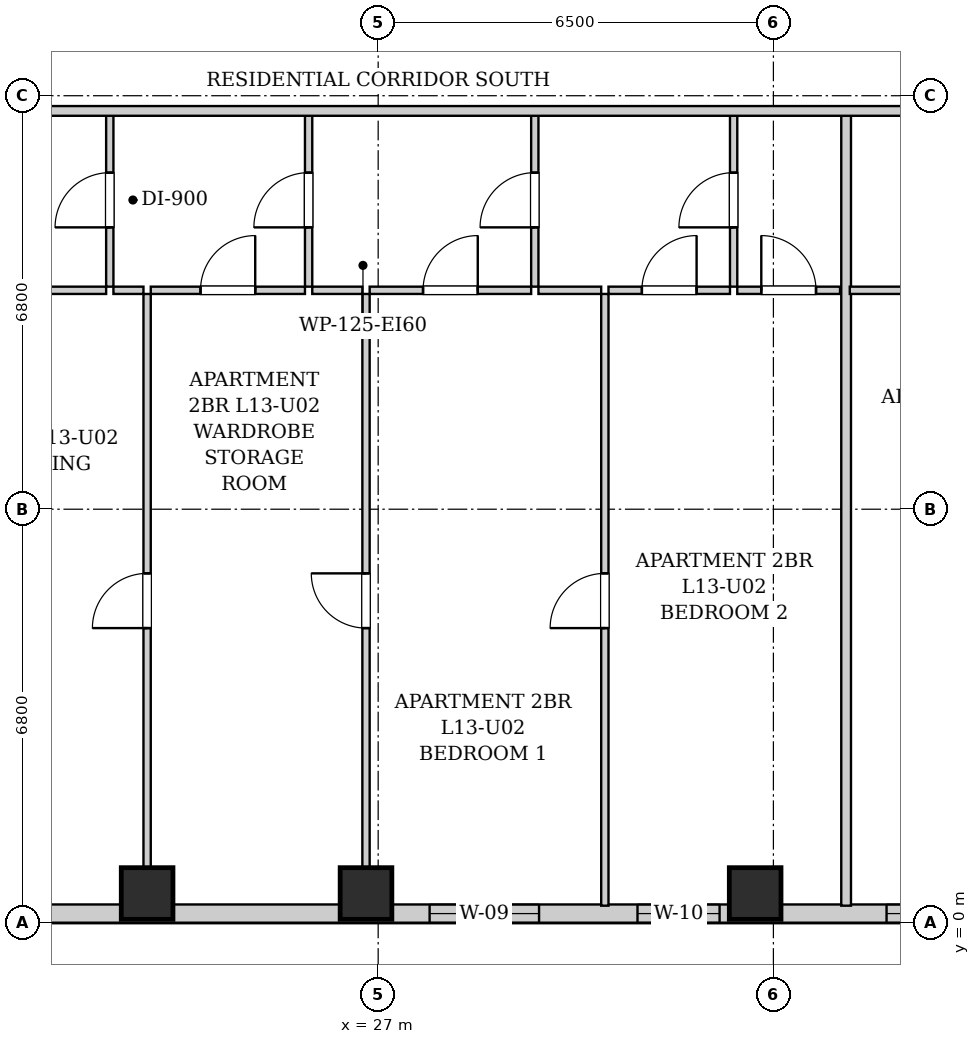
"""IFC4 building model, lengths in metres.
Left out: names, types, materials, properties, quantities, classifications, styles, units other than length and angle.
Written with IfcOpenShell. Run it as: python <this file> out.ifc"""

import sys

from ifc_helpers import new_model, si_unit, direction, frame, frame_2d, origin, origin_2d, place, context, subcontext, project, spatial, rectangle, extrude, element, fill, save


model = new_model("IFC4")
c1 = context("Model", 3, precision=1e-05, world=origin(), true_north=direction((0.0, 1.0)))
c2 = subcontext(c1, "Body", "Model", "MODEL_VIEW")
j1 = project(units=[si_unit("LENGTHUNIT", "METRE"), si_unit("PLANEANGLEUNIT", "RADIAN")], contexts=[c1])
p1 = place(None, origin())
s1 = spatial("IfcSite", under=j1, at=p1, CompositionType="ELEMENT")
p2 = place(p1, origin())
s2 = spatial("IfcBuilding", under=s1, at=p2, CompositionType="ELEMENT")
p3 = place(p2, frame((0.0, 0.0, 51.4)))
s3 = spatial("IfcBuildingStorey", under=s2, at=p3, CompositionType="ELEMENT", Elevation=51.4)
for number, where, z_axis, x_axis in (
    (1, (23.2, 0.48, 0.0), (0.0, 0.0, 1.0), (1.0, 0.0, 0.0)),
    (2, (26.8, 0.48, 0.0), (0.0, 0.0, 1.0), (1.0, 0.0, 0.0)),
    (3, (33.2, 0.48, 0.0), (0.0, 0.0, 1.0), (1.0, 0.0, 0.0)),
):
    element("IfcColumn", number, at=place(p3, frame(where, z_axis=z_axis, x_axis=x_axis)), inside=s3, PredefinedType="COLUMN", context=c2, shape_type="SweptSolid", body=[
        extrude(rectangle(XDim=0.85, YDim=0.85, at=origin_2d()), origin(), (0.0, 0.0, 1.0), 3.2),
    ])
p4 = place(p3, frame((44.0, 0.15, 0.0), z_axis=(0.0, 0.0, 1.0), x_axis=(-1.0, 0.0, 0.0)))
e4 = element("IfcWall", 4, at=p4, inside=s3, PredefinedType="SOLIDWALL", context=c2, shape_type="SweptSolid", body=[
    extrude(rectangle(XDim=26.15, YDim=0.3, at=frame_2d((13.075, 0.0))), origin(), (0.0, 0.0, 1.0), 1.975),
])
p5 = place(p4, frame((22.47, 0.0, 0.55)))
e5 = element("IfcOpeningElement", 5, at=p5, cuts=e4, PredefinedType="OPENING", context=c2, shape_type="SweptSolid", body=[
    extrude(rectangle(XDim=1.8, YDim=1.2, at=frame_2d((0.9, 0.6))), frame((0.0, 0.16, 0.0), z_axis=(0.0, -1.0, 0.0), x_axis=(1.0, 0.0, 0.0)), (0.0, 0.0, 1.0), 0.32),
])
p6 = place(p4, frame((14.354, 0.0, 0.55)))
e6 = element("IfcOpeningElement", 6, at=p6, cuts=e4, PredefinedType="OPENING", context=c2, shape_type="SweptSolid", body=[
    extrude(rectangle(XDim=1.8, YDim=1.2, at=frame_2d((0.9, 0.6))), frame((0.0, 0.16, 0.0), z_axis=(0.0, -1.0, 0.0), x_axis=(1.0, 0.0, 0.0)), (0.0, 0.0, 1.0), 0.32),
])
p7 = place(p4, frame((11.385, 0.0, 0.55)))
e7 = element("IfcOpeningElement", 7, at=p7, cuts=e4, PredefinedType="OPENING", context=c2, shape_type="SweptSolid", body=[
    extrude(rectangle(XDim=1.35, YDim=1.2, at=frame_2d((0.675, 0.6))), frame((0.0, 0.16, 0.0), z_axis=(0.0, -1.0, 0.0), x_axis=(1.0, 0.0, 0.0)), (0.0, 0.0, 1.0), 0.32),
])
p8 = place(p4, frame((6.839, 0.0, 0.55)))
e8 = element("IfcOpeningElement", 8, at=p8, cuts=e4, PredefinedType="OPENING", context=c2, shape_type="SweptSolid", body=[
    extrude(rectangle(XDim=1.8, YDim=1.2, at=frame_2d((0.9, 0.6))), frame((0.0, 0.16, 0.0), z_axis=(0.0, -1.0, 0.0), x_axis=(1.0, 0.0, 0.0)), (0.0, 0.0, 1.0), 0.32),
])
p9 = place(p4, frame((2.332, 0.0, 0.55)))
e9 = element("IfcOpeningElement", 9, at=p9, cuts=e4, PredefinedType="OPENING", context=c2, shape_type="SweptSolid", body=[
    extrude(rectangle(XDim=1.8, YDim=1.2, at=frame_2d((0.9, 0.6))), frame((0.0, 0.16, 0.0), z_axis=(0.0, -1.0, 0.0), x_axis=(1.0, 0.0, 0.0)), (0.0, 0.0, 1.0), 0.32),
])
p10 = place(p3, frame((22.586, 10.46, 0.0), z_axis=(0.0, 0.0, 1.0), x_axis=(0.0, 1.0, 0.0)))
e10 = element("IfcWall", 10, at=p10, inside=s3, PredefinedType="PARTITIONING", context=c2, shape_type="SweptSolid", body=[
    extrude(rectangle(XDim=2.85, YDim=0.12, at=frame_2d((1.425, 0.0))), origin(), (0.0, 0.0, 1.0), 2.94),
])
p11 = place(p10, frame((0.975, 0.0, 0.0)))
e11 = element("IfcOpeningElement", 11, at=p11, cuts=e10, PredefinedType="OPENING", context=c2, shape_type="SweptSolid", body=[
    extrude(rectangle(XDim=0.9, YDim=2.05, at=frame_2d((0.45, 1.025))), frame((0.0, 0.07, 0.0), z_axis=(0.0, -1.0, 0.0), x_axis=(1.0, 0.0, 0.0)), (0.0, 0.0, 1.0), 0.14),
])
p12 = place(p3, frame((18.086, 10.4, 0.0), z_axis=(0.0, 0.0, 1.0), x_axis=(1.0, 0.0, 0.0)))
e12 = element("IfcWall", 12, at=p12, inside=s3, PredefinedType="PARTITIONING", context=c2, shape_type="SweptSolid", body=[
    extrude(rectangle(XDim=4.44, YDim=0.12, at=frame_2d((2.22, 0.0))), origin(), (0.0, 0.0, 1.0), 2.94),
])
p13 = place(p12, frame((1.77, 0.0, 0.0)))
e13 = element("IfcOpeningElement", 13, at=p13, cuts=e12, PredefinedType="OPENING", context=c2, shape_type="SweptSolid", body=[
    extrude(rectangle(XDim=0.9, YDim=2.05, at=frame_2d((0.45, 1.025))), frame((0.0, 0.07, 0.0), z_axis=(0.0, -1.0, 0.0), x_axis=(1.0, 0.0, 0.0)), (0.0, 0.0, 1.0), 0.14),
])
p14 = place(p3, frame((25.856, 10.46, 0.0), z_axis=(0.0, 0.0, 1.0), x_axis=(0.0, 1.0, 0.0)))
e14 = element("IfcWall", 14, at=p14, inside=s3, PredefinedType="PARTITIONING", context=c2, shape_type="SweptSolid", body=[
    extrude(rectangle(XDim=2.85, YDim=0.12, at=frame_2d((1.425, 0.0))), origin(), (0.0, 0.0, 1.0), 2.94),
])
p15 = place(p14, frame((0.975, 0.0, 0.0)))
e15 = element("IfcOpeningElement", 15, at=p15, cuts=e14, PredefinedType="OPENING", context=c2, shape_type="SweptSolid", body=[
    extrude(rectangle(XDim=0.9, YDim=2.05, at=frame_2d((0.45, 1.025))), frame((0.0, 0.07, 0.0), z_axis=(0.0, -1.0, 0.0), x_axis=(1.0, 0.0, 0.0)), (0.0, 0.0, 1.0), 0.14),
])
p16 = place(p3, frame((22.646, 10.4, 0.0), z_axis=(0.0, 0.0, 1.0), x_axis=(1.0, 0.0, 0.0)))
e16 = element("IfcWall", 16, at=p16, inside=s3, PredefinedType="PARTITIONING", context=c2, shape_type="SweptSolid", body=[
    extrude(rectangle(XDim=0.494, YDim=0.12, at=frame_2d((0.247, 0.0))), origin(), (0.0, 0.0, 1.0), 2.94),
])
p17 = place(p3, frame((23.26, 10.4, 0.0), z_axis=(0.0, 0.0, 1.0), x_axis=(1.0, 0.0, 0.0)))
e17 = element("IfcWall", 17, at=p17, inside=s3, PredefinedType="PARTITIONING", context=c2, shape_type="SweptSolid", body=[
    extrude(rectangle(XDim=2.536, YDim=0.12, at=frame_2d((1.268, 0.0))), origin(), (0.0, 0.0, 1.0), 2.94),
])
p18 = place(p17, frame((0.818, 0.0, 0.0)))
e18 = element("IfcOpeningElement", 18, at=p18, cuts=e17, PredefinedType="OPENING", context=c2, shape_type="SweptSolid", body=[
    extrude(rectangle(XDim=0.9, YDim=2.05, at=frame_2d((0.45, 1.025))), frame((0.0, 0.07, 0.0), z_axis=(0.0, -1.0, 0.0), x_axis=(1.0, 0.0, 0.0)), (0.0, 0.0, 1.0), 0.14),
])
p19 = place(p3, frame((29.576, 10.46, 0.0), z_axis=(0.0, 0.0, 1.0), x_axis=(0.0, 1.0, 0.0)))
e19 = element("IfcWall", 19, at=p19, inside=s3, PredefinedType="PARTITIONING", context=c2, shape_type="SweptSolid", body=[
    extrude(rectangle(XDim=2.85, YDim=0.12, at=frame_2d((1.425, 0.0))), origin(), (0.0, 0.0, 1.0), 2.94),
])
p20 = place(p19, frame((0.975, 0.0, 0.0)))
e20 = element("IfcOpeningElement", 20, at=p20, cuts=e19, PredefinedType="OPENING", context=c2, shape_type="SweptSolid", body=[
    extrude(rectangle(XDim=0.9, YDim=2.05, at=frame_2d((0.45, 1.025))), frame((0.0, 0.07, 0.0), z_axis=(0.0, -1.0, 0.0), x_axis=(1.0, 0.0, 0.0)), (0.0, 0.0, 1.0), 0.14),
])
p21 = place(p3, frame((25.916, 10.4, 0.0), z_axis=(0.0, 0.0, 1.0), x_axis=(1.0, 0.0, 0.0)))
e21 = element("IfcWall", 21, at=p21, inside=s3, PredefinedType="PARTITIONING", context=c2, shape_type="SweptSolid", body=[
    extrude(rectangle(XDim=0.824, YDim=0.12, at=frame_2d((0.412, 0.0))), origin(), (0.0, 0.0, 1.0), 2.94),
])
p22 = place(p3, frame((26.86, 10.4, 0.0), z_axis=(0.0, 0.0, 1.0), x_axis=(1.0, 0.0, 0.0)))
e22 = element("IfcWall", 22, at=p22, inside=s3, PredefinedType="PARTITIONING", context=c2, shape_type="SweptSolid", body=[
    extrude(rectangle(XDim=2.656, YDim=0.12, at=frame_2d((1.328, 0.0))), origin(), (0.0, 0.0, 1.0), 2.94),
])
p23 = place(p22, frame((0.878, 0.0, 0.0)))
e23 = element("IfcOpeningElement", 23, at=p23, cuts=e22, PredefinedType="OPENING", context=c2, shape_type="SweptSolid", body=[
    extrude(rectangle(XDim=0.9, YDim=2.05, at=frame_2d((0.45, 1.025))), frame((0.0, 0.07, 0.0), z_axis=(0.0, -1.0, 0.0), x_axis=(1.0, 0.0, 0.0)), (0.0, 0.0, 1.0), 0.14),
])
p24 = place(p3, frame((32.846, 10.46, 0.0), z_axis=(0.0, 0.0, 1.0), x_axis=(0.0, 1.0, 0.0)))
e24 = element("IfcWall", 24, at=p24, inside=s3, PredefinedType="PARTITIONING", context=c2, shape_type="SweptSolid", body=[
    extrude(rectangle(XDim=2.85, YDim=0.12, at=frame_2d((1.425, 0.0))), origin(), (0.0, 0.0, 1.0), 2.94),
])
p25 = place(p24, frame((0.975, 0.0, 0.0)))
e25 = element("IfcOpeningElement", 25, at=p25, cuts=e24, PredefinedType="OPENING", context=c2, shape_type="SweptSolid", body=[
    extrude(rectangle(XDim=0.9, YDim=2.05, at=frame_2d((0.45, 1.025))), frame((0.0, 0.07, 0.0), z_axis=(0.0, -1.0, 0.0), x_axis=(1.0, 0.0, 0.0)), (0.0, 0.0, 1.0), 0.14),
])
p26 = place(p3, frame((29.636, 10.4, 0.0), z_axis=(0.0, 0.0, 1.0), x_axis=(1.0, 0.0, 0.0)))
e26 = element("IfcWall", 26, at=p26, inside=s3, PredefinedType="PARTITIONING", context=c2, shape_type="SweptSolid", body=[
    extrude(rectangle(XDim=1.032, YDim=0.12, at=frame_2d((0.516, 0.0))), origin(), (0.0, 0.0, 1.0), 2.94),
])
p27 = place(p3, frame((30.788, 10.4, 0.0), z_axis=(0.0, 0.0, 1.0), x_axis=(1.0, 0.0, 0.0)))
e27 = element("IfcWall", 27, at=p27, inside=s3, PredefinedType="PARTITIONING", context=c2, shape_type="SweptSolid", body=[
    extrude(rectangle(XDim=1.998, YDim=0.12, at=frame_2d((0.999, 0.0))), origin(), (0.0, 0.0, 1.0), 2.94),
])
p28 = place(p27, frame((0.549, 0.0, 0.0)))
e28 = element("IfcOpeningElement", 28, at=p28, cuts=e27, PredefinedType="OPENING", context=c2, shape_type="SweptSolid", body=[
    extrude(rectangle(XDim=0.9, YDim=2.05, at=frame_2d((0.45, 1.025))), frame((0.0, 0.07, 0.0), z_axis=(0.0, -1.0, 0.0), x_axis=(1.0, 0.0, 0.0)), (0.0, 0.0, 1.0), 0.14),
])
p29 = place(p3, frame((32.906, 10.4, 0.0), z_axis=(0.0, 0.0, 1.0), x_axis=(1.0, 0.0, 0.0)))
e29 = element("IfcWall", 29, at=p29, inside=s3, PredefinedType="PARTITIONING", context=c2, shape_type="SweptSolid", body=[
    extrude(rectangle(XDim=1.69, YDim=0.12, at=frame_2d((0.845, 0.0))), origin(), (0.0, 0.0, 1.0), 2.94),
])
p30 = place(p29, frame((0.395, 0.0, 0.0)))
e30 = element("IfcOpeningElement", 30, at=p30, cuts=e29, PredefinedType="OPENING", context=c2, shape_type="SweptSolid", body=[
    extrude(rectangle(XDim=0.9, YDim=2.05, at=frame_2d((0.45, 1.025))), frame((0.0, 0.07, 0.0), z_axis=(0.0, -1.0, 0.0), x_axis=(1.0, 0.0, 0.0)), (0.0, 0.0, 1.0), 0.14),
])
p31 = place(p3, frame((23.2, 0.28, 0.0), z_axis=(0.0, 0.0, 1.0), x_axis=(0.0, 1.0, 0.0)))
e31 = element("IfcWall", 31, at=p31, inside=s3, PredefinedType="PARTITIONING", context=c2, shape_type="SweptSolid", body=[
    extrude(rectangle(XDim=10.06, YDim=0.12, at=frame_2d((5.03, 0.0))), origin(), (0.0, 0.0, 1.0), 2.94),
])
p32 = place(p31, frame((4.565, 0.0, 0.0)))
e32 = element("IfcOpeningElement", 32, at=p32, cuts=e31, PredefinedType="OPENING", context=c2, shape_type="SweptSolid", body=[
    extrude(rectangle(XDim=0.9, YDim=2.05, at=frame_2d((0.45, 1.025))), frame((0.0, 0.07, 0.0), z_axis=(0.0, -1.0, 0.0), x_axis=(1.0, 0.0, 0.0)), (0.0, 0.0, 1.0), 0.14),
])
p33 = place(p3, frame((26.8, 0.28, 0.0), z_axis=(0.0, 0.0, 1.0), x_axis=(0.0, 1.0, 0.0)))
e33 = element("IfcWall", 33, at=p33, inside=s3, PredefinedType="PARTITIONING", context=c2, shape_type="SweptSolid", body=[
    extrude(rectangle(XDim=10.06, YDim=0.12, at=frame_2d((5.03, 0.0))), origin(), (0.0, 0.0, 1.0), 2.94),
])
p34 = place(p33, frame((4.565, 0.0, 0.0)))
e34 = element("IfcOpeningElement", 34, at=p34, cuts=e33, PredefinedType="OPENING", context=c2, shape_type="SweptSolid", body=[
    extrude(rectangle(XDim=0.9, YDim=2.05, at=frame_2d((0.45, 1.025))), frame((0.0, 0.07, 0.0), z_axis=(0.0, -1.0, 0.0), x_axis=(1.0, 0.0, 0.0)), (0.0, 0.0, 1.0), 0.14),
])
p35 = place(p3, frame((30.728, 0.28, 0.0), z_axis=(0.0, 0.0, 1.0), x_axis=(0.0, 1.0, 0.0)))
e35 = element("IfcWall", 35, at=p35, inside=s3, PredefinedType="PARTITIONING", context=c2, shape_type="SweptSolid", body=[
    extrude(rectangle(XDim=10.06, YDim=0.12, at=frame_2d((5.03, 0.0))), origin(), (0.0, 0.0, 1.0), 2.94),
])
p36 = place(p35, frame((4.565, 0.0, 0.0)))
e36 = element("IfcOpeningElement", 36, at=p36, cuts=e35, PredefinedType="OPENING", context=c2, shape_type="SweptSolid", body=[
    extrude(rectangle(XDim=0.9, YDim=2.05, at=frame_2d((0.45, 1.025))), frame((0.0, 0.07, 0.0), z_axis=(0.0, -1.0, 0.0), x_axis=(1.0, 0.0, 0.0)), (0.0, 0.0, 1.0), 0.14),
])
p37 = place(p3, frame((34.696, 0.28, 0.0), z_axis=(0.0, 0.0, 1.0), x_axis=(0.0, 1.0, 0.0)))
e37 = element("IfcWall", 37, at=p37, inside=s3, PredefinedType="PARTITIONING", context=c2, shape_type="SweptSolid", body=[
    extrude(rectangle(XDim=13.03, YDim=0.16, at=frame_2d((6.515, 0.0))), origin(), (0.0, 0.0, 1.0), 2.94),
])
p38 = place(p3, frame((34.756, 10.4, 0.0), z_axis=(0.0, 0.0, 1.0), x_axis=(1.0, 0.0, 0.0)))
e38 = element("IfcWall", 38, at=p38, inside=s3, PredefinedType="PARTITIONING", context=c2, shape_type="SweptSolid", body=[
    extrude(rectangle(XDim=2.4, YDim=0.12, at=frame_2d((1.2, 0.0))), origin(), (0.0, 0.0, 1.0), 2.94),
])
p39 = place(p3, frame((10.05, 13.35, 0.0), z_axis=(0.0, 0.0, 1.0), x_axis=(1.0, 0.0, 0.0)))
e39 = element("IfcWall", 39, at=p39, inside=s3, PredefinedType="PARTITIONING", context=c2, shape_type="SweptSolid", body=[
    extrude(rectangle(XDim=33.9, YDim=0.16, at=frame_2d((16.95, 0.0))), origin(), (0.0, 0.0, 1.0), 2.94),
])
p40 = place(p39, frame((3.203, 0.0, 0.0)))
e40 = element("IfcOpeningElement", 40, at=p40, cuts=e39, PredefinedType="OPENING", context=c2, shape_type="SweptSolid", body=[
    extrude(rectangle(XDim=0.95, YDim=2.1, at=frame_2d((0.475, 1.05))), frame((0.0, 0.09, 0.0), z_axis=(0.0, -1.0, 0.0), x_axis=(1.0, 0.0, 0.0)), (0.0, 0.0, 1.0), 0.18),
])
p41 = place(p39, frame((9.39, 0.0, 0.0)))
e41 = element("IfcOpeningElement", 41, at=p41, cuts=e39, PredefinedType="OPENING", context=c2, shape_type="SweptSolid", body=[
    extrude(rectangle(XDim=0.95, YDim=2.1, at=frame_2d((0.475, 1.05))), frame((0.0, 0.09, 0.0), z_axis=(0.0, -1.0, 0.0), x_axis=(1.0, 0.0, 0.0)), (0.0, 0.0, 1.0), 0.18),
])
p42 = place(p39, frame((28.476, 0.0, 0.0)))
e42 = element("IfcOpeningElement", 42, at=p42, cuts=e39, PredefinedType="OPENING", context=c2, shape_type="SweptSolid", body=[
    extrude(rectangle(XDim=0.95, YDim=2.1, at=frame_2d((0.475, 1.05))), frame((0.0, 0.09, 0.0), z_axis=(0.0, -1.0, 0.0), x_axis=(1.0, 0.0, 0.0)), (0.0, 0.0, 1.0), 0.18),
])
p43 = place(p11, origin())
e43 = element("IfcDoor", 43, at=p43, inside=s3, OperationType="SINGLE_SWING_LEFT", PredefinedType="DOOR", context=c2, shape_type="SweptSolid", body=[
    extrude(rectangle(XDim=0.9, YDim=2.05, at=frame_2d((0.45, 1.025))), frame((0.0, 0.025, 0.0), z_axis=(0.0, -1.0, 0.0), x_axis=(1.0, 0.0, 0.0)), (0.0, 0.0, 1.0), 0.05),
])
fill(e11, e43)
p44 = place(p15, origin())
e44 = element("IfcDoor", 44, at=p44, inside=s3, OperationType="SINGLE_SWING_LEFT", PredefinedType="DOOR", context=c2, shape_type="SweptSolid", body=[
    extrude(rectangle(XDim=0.9, YDim=2.05, at=frame_2d((0.45, 1.025))), frame((0.0, 0.025, 0.0), z_axis=(0.0, -1.0, 0.0), x_axis=(1.0, 0.0, 0.0)), (0.0, 0.0, 1.0), 0.05),
])
fill(e15, e44)
p45 = place(p18, origin())
e45 = element("IfcDoor", 45, at=p45, inside=s3, OperationType="SINGLE_SWING_RIGHT", PredefinedType="DOOR", context=c2, shape_type="SweptSolid", body=[
    extrude(rectangle(XDim=0.9, YDim=2.05, at=frame_2d((0.45, 1.025))), frame((0.0, 0.025, 0.0), z_axis=(0.0, -1.0, 0.0), x_axis=(1.0, 0.0, 0.0)), (0.0, 0.0, 1.0), 0.05),
])
fill(e18, e45)
p46 = place(p20, origin())
e46 = element("IfcDoor", 46, at=p46, inside=s3, OperationType="SINGLE_SWING_LEFT", PredefinedType="DOOR", context=c2, shape_type="SweptSolid", body=[
    extrude(rectangle(XDim=0.9, YDim=2.05, at=frame_2d((0.45, 1.025))), frame((0.0, 0.025, 0.0), z_axis=(0.0, -1.0, 0.0), x_axis=(1.0, 0.0, 0.0)), (0.0, 0.0, 1.0), 0.05),
])
fill(e20, e46)
p47 = place(p23, origin())
e47 = element("IfcDoor", 47, at=p47, inside=s3, OperationType="SINGLE_SWING_RIGHT", PredefinedType="DOOR", context=c2, shape_type="SweptSolid", body=[
    extrude(rectangle(XDim=0.9, YDim=2.05, at=frame_2d((0.45, 1.025))), frame((0.0, 0.025, 0.0), z_axis=(0.0, -1.0, 0.0), x_axis=(1.0, 0.0, 0.0)), (0.0, 0.0, 1.0), 0.05),
])
fill(e23, e47)
p48 = place(p25, origin())
e48 = element("IfcDoor", 48, at=p48, inside=s3, OperationType="SINGLE_SWING_LEFT", PredefinedType="DOOR", context=c2, shape_type="SweptSolid", body=[
    extrude(rectangle(XDim=0.9, YDim=2.05, at=frame_2d((0.45, 1.025))), frame((0.0, 0.025, 0.0), z_axis=(0.0, -1.0, 0.0), x_axis=(1.0, 0.0, 0.0)), (0.0, 0.0, 1.0), 0.05),
])
fill(e25, e48)
p49 = place(p28, origin())
e49 = element("IfcDoor", 49, at=p49, inside=s3, OperationType="SINGLE_SWING_RIGHT", PredefinedType="DOOR", context=c2, shape_type="SweptSolid", body=[
    extrude(rectangle(XDim=0.9, YDim=2.05, at=frame_2d((0.45, 1.025))), frame((0.0, 0.025, 0.0), z_axis=(0.0, -1.0, 0.0), x_axis=(1.0, 0.0, 0.0)), (0.0, 0.0, 1.0), 0.05),
])
fill(e28, e49)
p50 = place(p30, origin())
e50 = element("IfcDoor", 50, at=p50, inside=s3, OperationType="SINGLE_SWING_LEFT", PredefinedType="DOOR", context=c2, shape_type="SweptSolid", body=[
    extrude(rectangle(XDim=0.9, YDim=2.05, at=frame_2d((0.45, 1.025))), frame((0.0, 0.025, 0.0), z_axis=(0.0, -1.0, 0.0), x_axis=(1.0, 0.0, 0.0)), (0.0, 0.0, 1.0), 0.05),
])
fill(e30, e50)
p51 = place(p32, origin())
e51 = element("IfcDoor", 51, at=p51, inside=s3, OperationType="SINGLE_SWING_LEFT", PredefinedType="DOOR", context=c2, shape_type="SweptSolid", body=[
    extrude(rectangle(XDim=0.9, YDim=2.05, at=frame_2d((0.45, 1.025))), frame((0.0, 0.025, 0.0), z_axis=(0.0, -1.0, 0.0), x_axis=(1.0, 0.0, 0.0)), (0.0, 0.0, 1.0), 0.05),
])
fill(e32, e51)
p52 = place(p34, origin())
e52 = element("IfcDoor", 52, at=p52, inside=s3, OperationType="SINGLE_SWING_RIGHT", PredefinedType="DOOR", context=c2, shape_type="SweptSolid", body=[
    extrude(rectangle(XDim=0.9, YDim=2.05, at=frame_2d((0.45, 1.025))), frame((0.0, 0.025, 0.0), z_axis=(0.0, -1.0, 0.0), x_axis=(1.0, 0.0, 0.0)), (0.0, 0.0, 1.0), 0.05),
])
fill(e34, e52)
p53 = place(p36, origin())
e53 = element("IfcDoor", 53, at=p53, inside=s3, OperationType="SINGLE_SWING_LEFT", PredefinedType="DOOR", context=c2, shape_type="SweptSolid", body=[
    extrude(rectangle(XDim=0.9, YDim=2.05, at=frame_2d((0.45, 1.025))), frame((0.0, 0.025, 0.0), z_axis=(0.0, -1.0, 0.0), x_axis=(1.0, 0.0, 0.0)), (0.0, 0.0, 1.0), 0.05),
])
fill(e36, e53)
p54 = place(p6, origin())
e54 = element("IfcWindow", 54, at=p54, inside=s3, PartitioningType="DOUBLE_PANEL_VERTICAL", PredefinedType="WINDOW", context=c2, shape_type="SweptSolid", body=[
    extrude(rectangle(XDim=1.8, YDim=1.2, at=frame_2d((0.9, 0.6))), frame((0.0, 0.03, 0.0), z_axis=(0.0, -1.0, 0.0), x_axis=(1.0, 0.0, 0.0)), (0.0, 0.0, 1.0), 0.06),
])
fill(e6, e54)
p55 = place(p7, origin())
e55 = element("IfcWindow", 55, at=p55, inside=s3, PartitioningType="SINGLE_PANEL", PredefinedType="WINDOW", context=c2, shape_type="SweptSolid", body=[
    extrude(rectangle(XDim=1.35, YDim=1.2, at=frame_2d((0.675, 0.6))), frame((0.0, 0.03, 0.0), z_axis=(0.0, -1.0, 0.0), x_axis=(1.0, 0.0, 0.0)), (0.0, 0.0, 1.0), 0.06),
])
fill(e7, e55)
p56 = place(p8, origin())
e56 = element("IfcWindow", 56, at=p56, inside=s3, PartitioningType="DOUBLE_PANEL_VERTICAL", PredefinedType="WINDOW", context=c2, shape_type="SweptSolid", body=[
    extrude(rectangle(XDim=1.8, YDim=1.2, at=frame_2d((0.9, 0.6))), frame((0.0, 0.03, 0.0), z_axis=(0.0, -1.0, 0.0), x_axis=(1.0, 0.0, 0.0)), (0.0, 0.0, 1.0), 0.06),
])
fill(e8, e56)
save(model, sys.argv[1])
